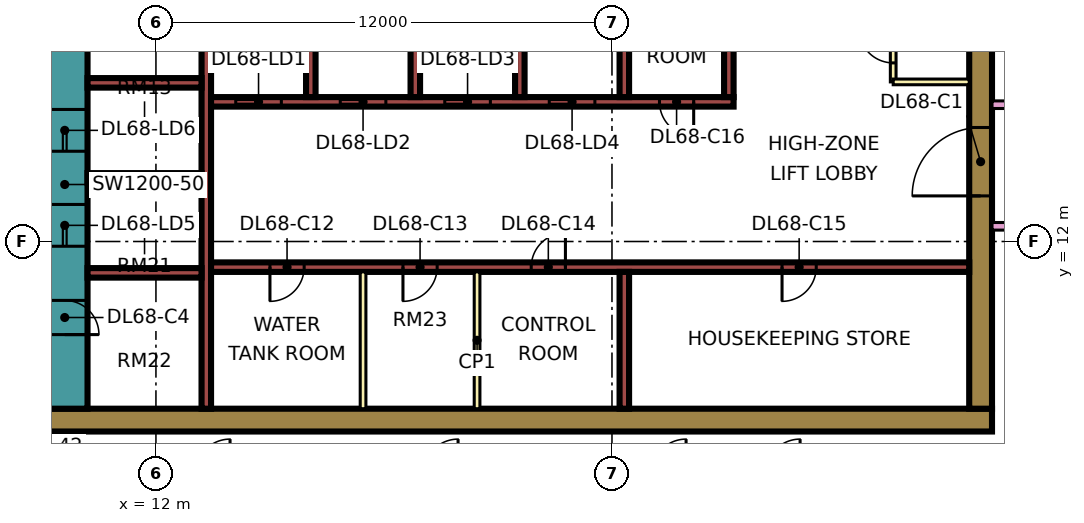
"""IFC4 building model, lengths in metres.
Left out: names, types, materials, properties, quantities, classifications, styles, units other than length and angle.
Written with IfcOpenShell. Run it as: python <this file> out.ifc"""

import sys

from ifc_helpers import new_model, si_unit, direction, frame, frame_2d, origin, place, context, subcontext, project, spatial, rectangle, extrude, element, fill, save


model = new_model("IFC4")
c1 = context("Model", 3, precision=1e-05, world=origin(), true_north=direction((0.0, 1.0)))
c2 = subcontext(c1, "Body", "Model", "MODEL_VIEW")
j1 = project(units=[si_unit("LENGTHUNIT", "METRE"), si_unit("PLANEANGLEUNIT", "RADIAN")], contexts=[c1])
p1 = place(None, origin())
s1 = spatial("IfcSite", under=j1, at=p1, CompositionType="ELEMENT")
p2 = place(p1, origin())
s2 = spatial("IfcBuilding", under=s1, at=p2, CompositionType="ELEMENT")
p3 = place(p2, frame((0.0, 0.0, 292.15)))
s3 = spatial("IfcBuildingStorey", under=s2, at=p3, CompositionType="ELEMENT", Elevation=292.15)
p4 = place(p3, frame((9.0, 7.3, 0.0), z_axis=(0.0, 0.0, 1.0), x_axis=(1.0, 0.0, 0.0)))
e1 = element("IfcWall", 1, at=p4, inside=s3, PredefinedType="SHEAR", context=c2, shape_type="SweptSolid", body=[
    extrude(rectangle(XDim=25.0, YDim=0.6, at=frame_2d((12.5, 0.0))), origin(), (0.0, 0.0, 1.0), 3.75),
])
p5 = place(p3, frame((9.6, 7.6, 0.0), z_axis=(0.0, 0.0, 1.0), x_axis=(0.0, 1.0, 0.0)))
e2 = element("IfcWall", 2, at=p5, inside=s3, PredefinedType="SHEAR", context=c2, shape_type="SweptSolid", body=[
    extrude(rectangle(XDim=11.8, YDim=1.2, at=frame_2d((5.9, 0.0))), origin(), (0.0, 0.0, 1.0), 3.75),
])
p6 = place(p5, frame((4.275, 0.0, 0.0)))
e3 = element("IfcOpeningElement", 3, at=p6, cuts=e2, PredefinedType="OPENING", context=c2, shape_type="SweptSolid", body=[
    extrude(rectangle(XDim=1.1, YDim=2.2, at=frame_2d((0.55, 1.1))), frame((0.0, 0.61, 0.0), z_axis=(0.0, -1.0, 0.0), x_axis=(1.0, 0.0, 0.0)), (0.0, 0.0, 1.0), 1.22),
])
p7 = place(p5, frame((6.775, 0.0, 0.0)))
e4 = element("IfcOpeningElement", 4, at=p7, cuts=e2, PredefinedType="OPENING", context=c2, shape_type="SweptSolid", body=[
    extrude(rectangle(XDim=1.1, YDim=2.2, at=frame_2d((0.55, 1.1))), frame((0.0, 0.61, 0.0), z_axis=(0.0, -1.0, 0.0), x_axis=(1.0, 0.0, 0.0)), (0.0, 0.0, 1.0), 1.22),
])
p8 = place(p5, frame((9.7, 0.0, 0.0)))
e5 = element("IfcOpeningElement", 5, at=p8, cuts=e2, PredefinedType="OPENING", context=c2, shape_type="SweptSolid", body=[
    extrude(rectangle(XDim=1.1, YDim=2.2, at=frame_2d((0.55, 1.1))), frame((0.0, 0.61, 0.0), z_axis=(0.0, -1.0, 0.0), x_axis=(1.0, 0.0, 0.0)), (0.0, 0.0, 1.0), 1.22),
])
p9 = place(p5, frame((1.95, 0.0, 0.0)))
e6 = element("IfcOpeningElement", 6, at=p9, cuts=e2, PredefinedType="OPENING", context=c2, shape_type="SweptSolid", body=[
    extrude(rectangle(XDim=0.9, YDim=2.1, at=frame_2d((0.45, 1.05))), frame((0.0, 0.61, 0.0), z_axis=(0.0, -1.0, 0.0), x_axis=(1.0, 0.0, 0.0)), (0.0, 0.0, 1.0), 1.22),
])
p10 = place(p3, frame((33.7, 7.6, 0.0), z_axis=(0.0, 0.0, 1.0), x_axis=(0.0, 1.0, 0.0)))
e7 = element("IfcWall", 7, at=p10, inside=s3, PredefinedType="SHEAR", context=c2, shape_type="SweptSolid", body=[
    extrude(rectangle(XDim=11.8, YDim=0.6, at=frame_2d((5.9, 0.0))), origin(), (0.0, 0.0, 1.0), 3.75),
])
p11 = place(p10, frame((5.6, 0.0, 0.0)))
e8 = element("IfcOpeningElement", 8, at=p11, cuts=e7, PredefinedType="OPENING", context=c2, shape_type="SweptSolid", body=[
    extrude(rectangle(XDim=1.8, YDim=2.4, at=frame_2d((0.9, 1.2))), frame((0.0, 0.31, 0.0), z_axis=(0.0, -1.0, 0.0), x_axis=(1.0, 0.0, 0.0)), (0.0, 0.0, 1.0), 0.62),
])
p12 = place(p3, frame((13.325, 7.6, 0.0), z_axis=(0.0, 0.0, 1.0), x_axis=(0.0, 1.0, 0.0)))
e9 = element("IfcWall", 9, at=p12, inside=s3, PredefinedType="SHEAR", context=c2, shape_type="SweptSolid", body=[
    extrude(rectangle(XDim=11.8, YDim=0.25, at=frame_2d((5.9, 0.0))), origin(), (0.0, 0.0, 1.0), 3.75),
])
p13 = place(p3, frame((13.45, 11.325, 0.0), z_axis=(0.0, 0.0, 1.0), x_axis=(1.0, 0.0, 0.0)))
e10 = element("IfcWall", 10, at=p13, inside=s3, PredefinedType="SHEAR", context=c2, shape_type="SweptSolid", body=[
    extrude(rectangle(XDim=19.95, YDim=0.25, at=frame_2d((9.975, 0.0))), origin(), (0.0, 0.0, 1.0), 3.75),
])
p14 = place(p13, frame((1.55, 0.0, 0.0)))
e11 = element("IfcOpeningElement", 11, at=p14, cuts=e10, PredefinedType="OPENING", context=c2, shape_type="SweptSolid", body=[
    extrude(rectangle(XDim=0.9, YDim=2.1, at=frame_2d((0.45, 1.05))), frame((0.0, 0.135, 0.0), z_axis=(0.0, -1.0, 0.0), x_axis=(1.0, 0.0, 0.0)), (0.0, 0.0, 1.0), 0.27),
])
p15 = place(p13, frame((5.05, 0.0, 0.0)))
e12 = element("IfcOpeningElement", 12, at=p15, cuts=e10, PredefinedType="OPENING", context=c2, shape_type="SweptSolid", body=[
    extrude(rectangle(XDim=0.9, YDim=2.1, at=frame_2d((0.45, 1.05))), frame((0.0, 0.135, 0.0), z_axis=(0.0, -1.0, 0.0), x_axis=(1.0, 0.0, 0.0)), (0.0, 0.0, 1.0), 0.27),
])
p16 = place(p13, frame((8.425, 0.0, 0.0)))
e13 = element("IfcOpeningElement", 13, at=p16, cuts=e10, PredefinedType="OPENING", context=c2, shape_type="SweptSolid", body=[
    extrude(rectangle(XDim=0.9, YDim=2.1, at=frame_2d((0.45, 1.05))), frame((0.0, 0.135, 0.0), z_axis=(0.0, -1.0, 0.0), x_axis=(1.0, 0.0, 0.0)), (0.0, 0.0, 1.0), 0.27),
])
p17 = place(p13, frame((15.025, 0.0, 0.0)))
e14 = element("IfcOpeningElement", 14, at=p17, cuts=e10, PredefinedType="OPENING", context=c2, shape_type="SweptSolid", body=[
    extrude(rectangle(XDim=0.9, YDim=2.1, at=frame_2d((0.45, 1.05))), frame((0.0, 0.135, 0.0), z_axis=(0.0, -1.0, 0.0), x_axis=(1.0, 0.0, 0.0)), (0.0, 0.0, 1.0), 0.27),
])
p18 = place(p3, frame((13.45, 15.675, 0.0), z_axis=(0.0, 0.0, 1.0), x_axis=(1.0, 0.0, 0.0)))
e15 = element("IfcWall", 15, at=p18, inside=s3, PredefinedType="SHEAR", context=c2, shape_type="SweptSolid", body=[
    extrude(rectangle(XDim=13.75, YDim=0.25, at=frame_2d((6.875, 0.0))), origin(), (0.0, 0.0, 1.0), 3.75),
])
p19 = place(p18, frame((0.65, 0.0, 0.0)))
e16 = element("IfcOpeningElement", 16, at=p19, cuts=e15, PredefinedType="OPENING", context=c2, shape_type="SweptSolid", body=[
    extrude(rectangle(XDim=1.2, YDim=2.2, at=frame_2d((0.6, 1.1))), frame((0.0, 0.135, 0.0), z_axis=(0.0, -1.0, 0.0), x_axis=(1.0, 0.0, 0.0)), (0.0, 0.0, 1.0), 0.27),
])
p20 = place(p18, frame((3.4, 0.0, 0.0)))
e17 = element("IfcOpeningElement", 17, at=p20, cuts=e15, PredefinedType="OPENING", context=c2, shape_type="SweptSolid", body=[
    extrude(rectangle(XDim=1.2, YDim=2.2, at=frame_2d((0.6, 1.1))), frame((0.0, 0.135, 0.0), z_axis=(0.0, -1.0, 0.0), x_axis=(1.0, 0.0, 0.0)), (0.0, 0.0, 1.0), 0.27),
])
p21 = place(p18, frame((6.15, 0.0, 0.0)))
e18 = element("IfcOpeningElement", 18, at=p21, cuts=e15, PredefinedType="OPENING", context=c2, shape_type="SweptSolid", body=[
    extrude(rectangle(XDim=1.2, YDim=2.2, at=frame_2d((0.6, 1.1))), frame((0.0, 0.135, 0.0), z_axis=(0.0, -1.0, 0.0), x_axis=(1.0, 0.0, 0.0)), (0.0, 0.0, 1.0), 0.27),
])
p22 = place(p18, frame((8.9, 0.0, 0.0)))
e19 = element("IfcOpeningElement", 19, at=p22, cuts=e15, PredefinedType="OPENING", context=c2, shape_type="SweptSolid", body=[
    extrude(rectangle(XDim=1.2, YDim=2.2, at=frame_2d((0.6, 1.1))), frame((0.0, 0.135, 0.0), z_axis=(0.0, -1.0, 0.0), x_axis=(1.0, 0.0, 0.0)), (0.0, 0.0, 1.0), 0.27),
])
p23 = place(p18, frame((11.8, 0.0, 0.0)))
e20 = element("IfcOpeningElement", 20, at=p23, cuts=e15, PredefinedType="OPENING", context=c2, shape_type="SweptSolid", body=[
    extrude(rectangle(XDim=0.9, YDim=2.1, at=frame_2d((0.45, 1.05))), frame((0.0, 0.135, 0.0), z_axis=(0.0, -1.0, 0.0), x_axis=(1.0, 0.0, 0.0)), (0.0, 0.0, 1.0), 0.27),
])
for number, where, z_axis, x_axis in (
    (21, (10.2, 11.175, 0.0), (0.0, 0.0, 1.0), (1.0, 0.0, 0.0)),
    (22, (10.2, 13.675, 0.0), (0.0, 0.0, 1.0), (1.0, 0.0, 0.0)),
    (23, (10.2, 16.175, 0.0), (0.0, 0.0, 1.0), (1.0, 0.0, 0.0)),
):
    element("IfcWall", number, at=place(p3, frame(where, z_axis=z_axis, x_axis=x_axis)), inside=s3, PredefinedType="SHEAR", context=c2, shape_type="SweptSolid", body=[
        extrude(rectangle(XDim=3.0, YDim=0.25, at=frame_2d((1.5, 0.0))), origin(), (0.0, 0.0, 1.0), 3.75),
    ])
for number, where, z_axis, x_axis in (
    (24, (24.325, 7.6, 0.0), (0.0, 0.0, 1.0), (0.0, 1.0, 0.0)),
    (25, (16.075, 15.8, 0.0), (0.0, 0.0, 1.0), (0.0, 1.0, 0.0)),
    (26, (18.825, 15.8, 0.0), (0.0, 0.0, 1.0), (0.0, 1.0, 0.0)),
    (27, (21.575, 15.8, 0.0), (0.0, 0.0, 1.0), (0.0, 1.0, 0.0)),
    (28, (24.325, 15.8, 0.0), (0.0, 0.0, 1.0), (0.0, 1.0, 0.0)),
    (29, (27.075, 15.8, 0.0), (0.0, 0.0, 1.0), (0.0, 1.0, 0.0)),
):
    element("IfcWall", number, at=place(p3, frame(where, z_axis=z_axis, x_axis=x_axis)), inside=s3, PredefinedType="SHEAR", context=c2, shape_type="SweptSolid", body=[
        extrude(rectangle(XDim=3.6, YDim=0.25, at=frame_2d((1.8, 0.0))), origin(), (0.0, 0.0, 1.0), 3.75),
    ])
p24 = place(p3, frame((-1.447, 12.553, 0.0), z_axis=(0.0, 0.0, 1.0), x_axis=(0.707106781187, -0.707106781187, 0.0)))
e30 = element("IfcWall", 30, at=p24, inside=s3, PredefinedType="SOLIDWALL", context=c2, shape_type="SweptSolid", body=[
    extrude(rectangle(XDim=19.799, YDim=0.15, at=frame_2d((9.899, 0.0))), origin(), (0.0, 0.0, 1.0), 3.35),
])
p25 = place(p24, frame((2.212, 0.0, 0.45)))
e31 = element("IfcOpeningElement", 31, at=p25, cuts=e30, PredefinedType="OPENING", context=c2, shape_type="SweptSolid", body=[
    extrude(rectangle(XDim=3.0, YDim=2.4, at=frame_2d((1.5, 1.2))), frame((0.0, 0.085, 0.0), z_axis=(0.0, -1.0, 0.0), x_axis=(1.0, 0.0, 0.0)), (0.0, 0.0, 1.0), 0.17),
])
p26 = place(p24, frame((10.216, 0.0, 0.45)))
e32 = element("IfcOpeningElement", 32, at=p26, cuts=e30, PredefinedType="OPENING", context=c2, shape_type="SweptSolid", body=[
    extrude(rectangle(XDim=3.0, YDim=2.4, at=frame_2d((1.5, 1.2))), frame((0.0, 0.085, 0.0), z_axis=(0.0, -1.0, 0.0), x_axis=(1.0, 0.0, 0.0)), (0.0, 0.0, 1.0), 0.17),
])
for number, where, z_axis, x_axis in (
    (33, (17.45, 7.6, 0.0), (0.0, 0.0, 1.0), (0.0, 1.0, 0.0)),
    (34, (20.45, 7.6, 0.0), (0.0, 0.0, 1.0), (0.0, 1.0, 0.0)),
):
    element("IfcWall", number, at=place(p3, frame(where, z_axis=z_axis, x_axis=x_axis)), inside=s3, PredefinedType="PARTITIONING", context=c2, shape_type="SweptSolid", body=[
        extrude(rectangle(XDim=3.6, YDim=0.15, at=frame_2d((1.8, 0.0))), origin(), (0.0, 0.0, 1.0), 3.35),
    ])
p27 = place(p3, frame((31.4, 16.2, 0.0), z_axis=(0.0, 0.0, 1.0), x_axis=(0.0, 1.0, 0.0)))
e35 = element("IfcWall", 35, at=p27, inside=s3, PredefinedType="PARTITIONING", context=c2, shape_type="SweptSolid", body=[
    extrude(rectangle(XDim=3.2, YDim=0.15, at=frame_2d((1.6, 0.0))), origin(), (0.0, 0.0, 1.0), 3.35),
])
p28 = place(p27, frame((0.5, 0.0, 0.0)))
e36 = element("IfcOpeningElement", 36, at=p28, cuts=e35, PredefinedType="OPENING", context=c2, shape_type="SweptSolid", body=[
    extrude(rectangle(XDim=0.9, YDim=2.1, at=frame_2d((0.45, 1.05))), frame((0.0, 0.085, 0.0), z_axis=(0.0, -1.0, 0.0), x_axis=(1.0, 0.0, 0.0)), (0.0, 0.0, 1.0), 0.17),
])
p29 = place(p3, frame((31.4, 16.2, 0.0), z_axis=(0.0, 0.0, 1.0), x_axis=(1.0, 0.0, 0.0)))
e37 = element("IfcWall", 37, at=p29, inside=s3, PredefinedType="PARTITIONING", context=c2, shape_type="SweptSolid", body=[
    extrude(rectangle(XDim=2.0, YDim=0.15, at=frame_2d((1.0, 0.0))), origin(), (0.0, 0.0, 1.0), 3.35),
])
p30 = place(p3, frame((34.0, 12.4, 0.0), z_axis=(0.0, 0.0, 1.0), x_axis=(1.0, 0.0, 0.0)))
e38 = element("IfcWall", 38, at=p30, inside=s3, PredefinedType="PARTITIONING", context=c2, shape_type="SweptSolid", body=[
    extrude(rectangle(XDim=2.401, YDim=0.2, at=frame_2d((1.2, 0.0))), origin(), (0.0, 0.0, 1.0), 3.35),
])
p31 = place(p3, frame((34.0, 15.6, 0.0), z_axis=(0.0, 0.0, 1.0), x_axis=(1.0, 0.0, 0.0)))
e39 = element("IfcWall", 39, at=p31, inside=s3, PredefinedType="PARTITIONING", context=c2, shape_type="SweptSolid", body=[
    extrude(rectangle(XDim=10.35, YDim=0.2, at=frame_2d((5.175, 0.0))), origin(), (0.0, 0.0, 1.0), 3.35),
])
p32 = place(p31, frame((5.6, 0.0, 0.0)))
e40 = element("IfcOpeningElement", 40, at=p32, cuts=e39, PredefinedType="OPENING", context=c2, shape_type="SweptSolid", body=[
    extrude(rectangle(XDim=1.0, YDim=2.1, at=frame_2d((0.5, 1.05))), frame((0.0, 0.11, 0.0), z_axis=(0.0, -1.0, 0.0), x_axis=(1.0, 0.0, 0.0)), (0.0, 0.0, 1.0), 0.22),
])
p33 = place(p31, frame((0.45, 0.0, 0.0)))
e41 = element("IfcOpeningElement", 41, at=p33, cuts=e39, PredefinedType="OPENING", context=c2, shape_type="SweptSolid", body=[
    extrude(rectangle(XDim=1.2, YDim=2.1, at=frame_2d((0.6, 1.05))), frame((0.0, 0.11, 0.0), z_axis=(0.0, -1.0, 0.0), x_axis=(1.0, 0.0, 0.0)), (0.0, 0.0, 1.0), 0.22),
])
p34 = place(p19, origin())
e42 = element("IfcDoor", 42, at=p34, inside=s3, OperationType="DOUBLE_DOOR_SLIDING", PredefinedType="DOOR", context=c2, shape_type="SweptSolid", body=[
    extrude(rectangle(XDim=1.2, YDim=2.2, at=frame_2d((0.6, 1.1))), frame((0.0, 0.025, 0.0), z_axis=(0.0, -1.0, 0.0), x_axis=(1.0, 0.0, 0.0)), (0.0, 0.0, 1.0), 0.05),
])
fill(e16, e42)
p35 = place(p20, origin())
e43 = element("IfcDoor", 43, at=p35, inside=s3, OperationType="DOUBLE_DOOR_SLIDING", PredefinedType="DOOR", context=c2, shape_type="SweptSolid", body=[
    extrude(rectangle(XDim=1.2, YDim=2.2, at=frame_2d((0.6, 1.1))), frame((0.0, 0.025, 0.0), z_axis=(0.0, -1.0, 0.0), x_axis=(1.0, 0.0, 0.0)), (0.0, 0.0, 1.0), 0.05),
])
fill(e17, e43)
p36 = place(p21, origin())
e44 = element("IfcDoor", 44, at=p36, inside=s3, OperationType="DOUBLE_DOOR_SLIDING", PredefinedType="DOOR", context=c2, shape_type="SweptSolid", body=[
    extrude(rectangle(XDim=1.2, YDim=2.2, at=frame_2d((0.6, 1.1))), frame((0.0, 0.025, 0.0), z_axis=(0.0, -1.0, 0.0), x_axis=(1.0, 0.0, 0.0)), (0.0, 0.0, 1.0), 0.05),
])
fill(e18, e44)
p37 = place(p22, origin())
e45 = element("IfcDoor", 45, at=p37, inside=s3, OperationType="DOUBLE_DOOR_SLIDING", PredefinedType="DOOR", context=c2, shape_type="SweptSolid", body=[
    extrude(rectangle(XDim=1.2, YDim=2.2, at=frame_2d((0.6, 1.1))), frame((0.0, 0.025, 0.0), z_axis=(0.0, -1.0, 0.0), x_axis=(1.0, 0.0, 0.0)), (0.0, 0.0, 1.0), 0.05),
])
fill(e19, e45)
p38 = place(p6, origin())
e46 = element("IfcDoor", 46, at=p38, inside=s3, OperationType="DOUBLE_DOOR_SLIDING", PredefinedType="DOOR", context=c2, shape_type="SweptSolid", body=[
    extrude(rectangle(XDim=1.1, YDim=2.2, at=frame_2d((0.55, 1.1))), frame((0.0, 0.025, 0.0), z_axis=(0.0, -1.0, 0.0), x_axis=(1.0, 0.0, 0.0)), (0.0, 0.0, 1.0), 0.05),
])
fill(e3, e46)
p39 = place(p7, origin())
e47 = element("IfcDoor", 47, at=p39, inside=s3, OperationType="DOUBLE_DOOR_SLIDING", PredefinedType="DOOR", context=c2, shape_type="SweptSolid", body=[
    extrude(rectangle(XDim=1.1, YDim=2.2, at=frame_2d((0.55, 1.1))), frame((0.0, 0.025, 0.0), z_axis=(0.0, -1.0, 0.0), x_axis=(1.0, 0.0, 0.0)), (0.0, 0.0, 1.0), 0.05),
])
fill(e4, e47)
p40 = place(p11, origin())
e48 = element("IfcDoor", 48, at=p40, inside=s3, OperationType="DOUBLE_DOOR_SINGLE_SWING", PredefinedType="DOOR", context=c2, shape_type="SweptSolid", body=[
    extrude(rectangle(XDim=1.8, YDim=2.4, at=frame_2d((0.9, 1.2))), frame((0.0, 0.025, 0.0), z_axis=(0.0, -1.0, 0.0), x_axis=(1.0, 0.0, 0.0)), (0.0, 0.0, 1.0), 0.05),
])
fill(e8, e48)
p41 = place(p9, frame((0.9, 0.0, 0.0), z_axis=(0.0, 0.0, 1.0), x_axis=(-1.0, 0.0, 0.0)))
e49 = element("IfcDoor", 49, at=p41, inside=s3, OperationType="SINGLE_SWING_LEFT", PredefinedType="DOOR", context=c2, shape_type="SweptSolid", body=[
    extrude(rectangle(XDim=0.9, YDim=2.1, at=frame_2d((0.45, 1.05))), frame((0.0, 0.025, 0.0), z_axis=(0.0, -1.0, 0.0), x_axis=(1.0, 0.0, 0.0)), (0.0, 0.0, 1.0), 0.05),
])
fill(e6, e49)
p42 = place(p14, frame((0.9, 0.0, 0.0), z_axis=(0.0, 0.0, 1.0), x_axis=(-1.0, 0.0, 0.0)))
e50 = element("IfcDoor", 50, at=p42, inside=s3, OperationType="SINGLE_SWING_LEFT", PredefinedType="DOOR", context=c2, shape_type="SweptSolid", body=[
    extrude(rectangle(XDim=0.9, YDim=2.1, at=frame_2d((0.45, 1.05))), frame((0.0, 0.025, 0.0), z_axis=(0.0, -1.0, 0.0), x_axis=(1.0, 0.0, 0.0)), (0.0, 0.0, 1.0), 0.05),
])
fill(e11, e50)
p43 = place(p15, frame((0.9, 0.0, 0.0), z_axis=(0.0, 0.0, 1.0), x_axis=(-1.0, 0.0, 0.0)))
e51 = element("IfcDoor", 51, at=p43, inside=s3, OperationType="SINGLE_SWING_LEFT", PredefinedType="DOOR", context=c2, shape_type="SweptSolid", body=[
    extrude(rectangle(XDim=0.9, YDim=2.1, at=frame_2d((0.45, 1.05))), frame((0.0, 0.025, 0.0), z_axis=(0.0, -1.0, 0.0), x_axis=(1.0, 0.0, 0.0)), (0.0, 0.0, 1.0), 0.05),
])
fill(e12, e51)
p44 = place(p16, frame((0.9, 0.0, 0.0), z_axis=(0.0, 0.0, 1.0), x_axis=(-1.0, 0.0, 0.0)))
e52 = element("IfcDoor", 52, at=p44, inside=s3, OperationType="SINGLE_SWING_RIGHT", PredefinedType="DOOR", context=c2, shape_type="SweptSolid", body=[
    extrude(rectangle(XDim=0.9, YDim=2.1, at=frame_2d((0.45, 1.05))), frame((0.0, 0.025, 0.0), z_axis=(0.0, -1.0, 0.0), x_axis=(1.0, 0.0, 0.0)), (0.0, 0.0, 1.0), 0.05),
])
fill(e13, e52)
p45 = place(p17, frame((0.9, 0.0, 0.0), z_axis=(0.0, 0.0, 1.0), x_axis=(-1.0, 0.0, 0.0)))
e53 = element("IfcDoor", 53, at=p45, inside=s3, OperationType="SINGLE_SWING_LEFT", PredefinedType="DOOR", context=c2, shape_type="SweptSolid", body=[
    extrude(rectangle(XDim=0.9, YDim=2.1, at=frame_2d((0.45, 1.05))), frame((0.0, 0.025, 0.0), z_axis=(0.0, -1.0, 0.0), x_axis=(1.0, 0.0, 0.0)), (0.0, 0.0, 1.0), 0.05),
])
fill(e14, e53)
p46 = place(p23, origin())
e54 = element("IfcDoor", 54, at=p46, inside=s3, OperationType="SINGLE_SWING_RIGHT", PredefinedType="DOOR", context=c2, shape_type="SweptSolid", body=[
    extrude(rectangle(XDim=0.9, YDim=2.1, at=frame_2d((0.45, 1.05))), frame((0.0, 0.025, 0.0), z_axis=(0.0, -1.0, 0.0), x_axis=(1.0, 0.0, 0.0)), (0.0, 0.0, 1.0), 0.05),
])
fill(e20, e54)
p47 = place(p28, frame((0.9, 0.0, 0.0), z_axis=(0.0, 0.0, 1.0), x_axis=(-1.0, 0.0, 0.0)))
e55 = element("IfcDoor", 55, at=p47, inside=s3, OperationType="SINGLE_SWING_RIGHT", PredefinedType="DOOR", context=c2, shape_type="SweptSolid", body=[
    extrude(rectangle(XDim=0.9, YDim=2.1, at=frame_2d((0.45, 1.05))), frame((0.0, 0.025, 0.0), z_axis=(0.0, -1.0, 0.0), x_axis=(1.0, 0.0, 0.0)), (0.0, 0.0, 1.0), 0.05),
])
fill(e36, e55)
save(model, sys.argv[1])
